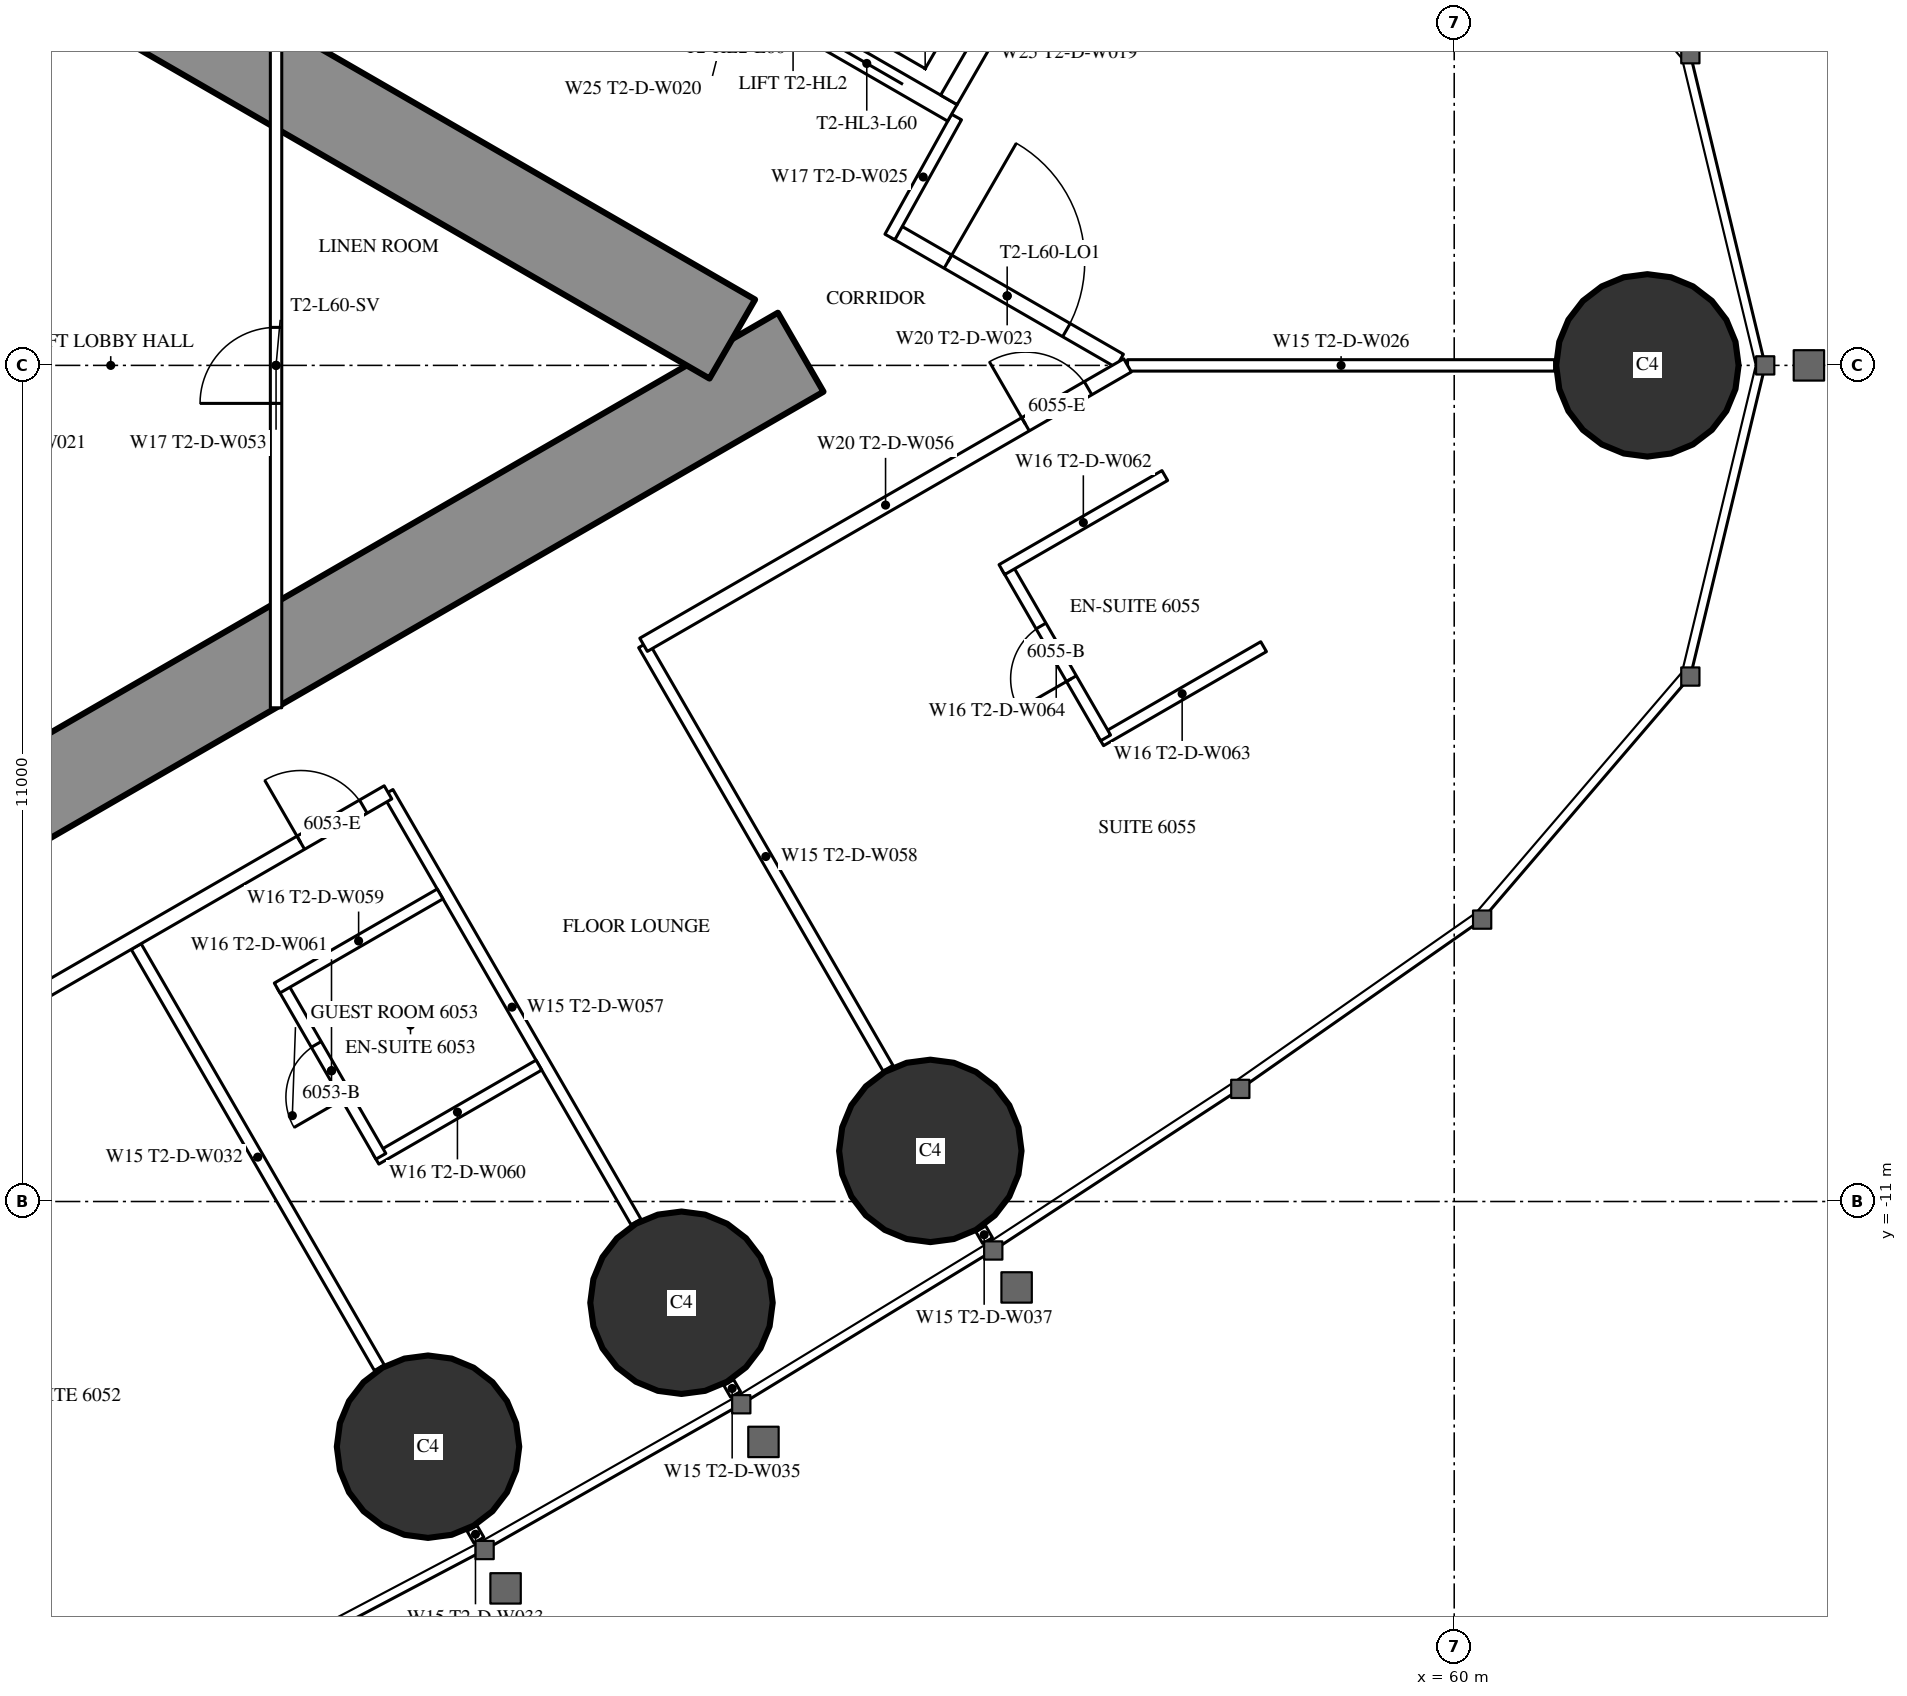
"""IFC4 building model, lengths in metres.
Left out: names, types, materials, properties, quantities, classifications, styles, units other than length and angle.
Written with IfcOpenShell. Run it as: python <this file> out.ifc"""

import sys

from ifc_helpers import new_model, si_unit, direction, frame, frame_2d, origin, origin_2d, place, context, subcontext, project, spatial, rectangle, circle, extrude, element, fill, save


model = new_model("IFC4")
c1 = context("Model", 3, precision=1e-05, world=origin(), true_north=direction((0.0, 1.0)))
c2 = subcontext(c1, "Body", "Model", "MODEL_VIEW")
j1 = project(units=[si_unit("LENGTHUNIT", "METRE"), si_unit("PLANEANGLEUNIT", "RADIAN")], contexts=[c1])
p1 = place(None, origin())
s1 = spatial("IfcSite", under=j1, at=p1, CompositionType="ELEMENT")
p2 = place(p1, origin())
s2 = spatial("IfcBuilding", under=s1, at=p2, CompositionType="ELEMENT")
p3 = place(p2, frame((0.0, 0.0, 226.1)))
s3 = spatial("IfcBuildingStorey", under=s2, at=p3, CompositionType="ELEMENT", Elevation=226.1)
for number, where, z_axis, x_axis in (
    (1, (62.542, 0.0, 0.0), (0.0, 0.0, 1.0), (1.0, 0.0, 0.0)),
    (2, (46.499, -14.226, 0.0), (0.0, 0.0, 1.0), (1.0, 0.0, 0.0)),
    (3, (49.834, -12.332, 0.0), (0.0, 0.0, 1.0), (1.0, 0.0, 0.0)),
    (4, (53.108, -10.334, 0.0), (0.0, 0.0, 1.0), (1.0, 0.0, 0.0)),
):
    element("IfcColumn", number, at=place(p3, frame(where, z_axis=z_axis, x_axis=x_axis)), inside=s3, PredefinedType="COLUMN", context=c2, shape_type="SweptSolid", body=[
        extrude(circle(Radius=1.2, at=origin_2d()), origin(), (0.0, 0.0, 1.0), 3.6),
    ])
p4 = place(p3, frame((27.2, -13.8, 0.0), z_axis=(0.0, 0.0, 1.0), x_axis=(0.866027159892, 0.499996958321, 0.0)))
e5 = element("IfcWall", 5, at=p4, inside=s3, PredefinedType="SHEAR", context=c2, shape_type="SweptSolid", body=[
    extrude(rectangle(XDim=27.947, YDim=1.2, at=frame_2d((13.973, 0.0))), origin(), (0.0, 0.0, 1.0), 3.6),
])
p5 = place(p4, frame((4.6, 0.0, 0.0)))
e6 = element("IfcOpeningElement", 6, at=p5, cuts=e5, PredefinedType="OPENING", context=c2, shape_type="SweptSolid", body=[
    extrude(rectangle(XDim=1.0, YDim=2.2, at=frame_2d((0.5, 1.1))), frame((0.0, 0.61, 0.0), z_axis=(0.0, -1.0, 0.0), x_axis=(1.0, 0.0, 0.0)), (0.0, 0.0, 1.0), 1.22),
])
p6 = place(p4, frame((13.395, 0.0, 0.0)))
e7 = element("IfcOpeningElement", 7, at=p6, cuts=e5, PredefinedType="OPENING", context=c2, shape_type="SweptSolid", body=[
    extrude(rectangle(XDim=1.8, YDim=2.2, at=frame_2d((0.9, 1.1))), frame((0.0, 0.61, 0.0), z_axis=(0.0, -1.0, 0.0), x_axis=(1.0, 0.0, 0.0)), (0.0, 0.0, 1.0), 1.22),
])
p7 = place(p3, frame((27.2, 13.8, 0.0), z_axis=(0.0, 0.0, 1.0), x_axis=(0.866024515034, -0.500001539357, 0.0)))
e8 = element("IfcWall", 8, at=p7, inside=s3, PredefinedType="SHEAR", context=c2, shape_type="SweptSolid", body=[
    extrude(rectangle(XDim=26.907, YDim=1.2, at=frame_2d((13.454, 0.0))), origin(), (0.0, 0.0, 1.0), 3.6),
])
p8 = place(p7, frame((4.6, 0.0, 0.0)))
e9 = element("IfcOpeningElement", 9, at=p8, cuts=e8, PredefinedType="OPENING", context=c2, shape_type="SweptSolid", body=[
    extrude(rectangle(XDim=1.0, YDim=2.2, at=frame_2d((0.5, 1.1))), frame((0.0, 0.61, 0.0), z_axis=(0.0, -1.0, 0.0), x_axis=(1.0, 0.0, 0.0)), (0.0, 0.0, 1.0), 1.22),
])
p9 = place(p7, frame((13.395, 0.0, 0.0)))
e10 = element("IfcOpeningElement", 10, at=p9, cuts=e8, PredefinedType="OPENING", context=c2, shape_type="SweptSolid", body=[
    extrude(rectangle(XDim=1.8, YDim=2.2, at=frame_2d((0.9, 1.1))), frame((0.0, 0.61, 0.0), z_axis=(0.0, -1.0, 0.0), x_axis=(1.0, 0.0, 0.0)), (0.0, 0.0, 1.0), 1.22),
])
p10 = place(p3, frame((42.66, -7.646, 0.0), z_axis=(0.0, 0.0, 1.0), x_axis=(0.499996592859, -0.866027370889, 0.0)))
e11 = element("IfcWall", 11, at=p10, inside=s3, PredefinedType="PARTITIONING", context=c2, shape_type="SweptSolid", body=[
    extrude(rectangle(XDim=6.398, YDim=0.15, at=frame_2d((3.199, 0.0))), origin(), (0.0, 0.0, 1.0), 2.45),
])
p11 = place(p3, frame((47.079, -15.3, 0.0), z_axis=(0.0, 0.0, 1.0), x_axis=(0.499212083968, -0.866479829667, 0.0)))
e12 = element("IfcWall", 12, at=p11, inside=s3, PredefinedType="PARTITIONING", context=c2, shape_type="SweptSolid", body=[
    extrude(rectangle(XDim=0.179, YDim=0.15, at=frame_2d((0.09, 0.0))), origin(), (0.0, 0.0, 1.0), 2.45),
])
p12 = place(p3, frame((45.973, -5.617, 0.0), z_axis=(0.0, 0.0, 1.0), x_axis=(0.499985856986, -0.866033569104, 0.0)))
e13 = element("IfcWall", 13, at=p12, inside=s3, PredefinedType="PARTITIONING", context=c2, shape_type="SweptSolid", body=[
    extrude(rectangle(XDim=6.526, YDim=0.15, at=frame_2d((3.263, 0.0))), origin(), (0.0, 0.0, 1.0), 2.45),
])
p13 = place(p3, frame((50.456, -13.382, 0.0), z_axis=(0.0, 0.0, 1.0), x_axis=(0.500661834965, -0.865642955848, 0.0)))
e14 = element("IfcWall", 14, at=p13, inside=s3, PredefinedType="PARTITIONING", context=c2, shape_type="SweptSolid", body=[
    extrude(rectangle(XDim=0.18, YDim=0.15, at=frame_2d((0.09, 0.0))), origin(), (0.0, 0.0, 1.0), 2.45),
])
p14 = place(p3, frame((49.335, -3.676, 0.0), z_axis=(0.0, 0.0, 1.0), x_axis=(0.500000613642, -0.866025049498, 0.0)))
e15 = element("IfcWall", 15, at=p14, inside=s3, PredefinedType="PARTITIONING", context=c2, shape_type="SweptSolid", body=[
    extrude(rectangle(XDim=6.433, YDim=0.15, at=frame_2d((3.216, 0.0))), origin(), (0.0, 0.0, 1.0), 2.45),
])
p15 = place(p3, frame((53.771, -11.36, 0.0), z_axis=(0.0, 0.0, 1.0), x_axis=(0.499524978789, -0.866299483762, 0.0)))
e16 = element("IfcWall", 16, at=p15, inside=s3, PredefinedType="PARTITIONING", context=c2, shape_type="SweptSolid", body=[
    extrude(rectangle(XDim=0.178, YDim=0.15, at=frame_2d((0.089, 0.0))), origin(), (0.0, 0.0, 1.0), 2.45),
])
p16 = place(p3, frame((55.702, 0.0, 0.0), z_axis=(0.0, 0.0, 1.0), x_axis=(1.0, 0.0, 0.0)))
e17 = element("IfcWall", 17, at=p16, inside=s3, PredefinedType="PARTITIONING", context=c2, shape_type="SweptSolid", body=[
    extrude(rectangle(XDim=5.619, YDim=0.15, at=frame_2d((2.81, 0.0))), origin(), (0.0, 0.0, 1.0), 2.45),
])
p17 = place(p3, frame((52.639, 1.769, 0.0), z_axis=(0.0, 0.0, 1.0), x_axis=(0.866027340901, -0.4999966448, 0.0)))
e18 = element("IfcWall", 18, at=p17, inside=s3, PredefinedType="PARTITIONING", context=c2, shape_type="SweptSolid", body=[
    extrude(rectangle(XDim=3.417, YDim=0.2, at=frame_2d((1.708, 0.0))), origin(), (0.0, 0.0, 1.0), 3.35),
])
p18 = place(p17, frame((0.809, 0.0, 0.0)))
e19 = element("IfcOpeningElement", 19, at=p18, cuts=e18, PredefinedType="OPENING", context=c2, shape_type="SweptSolid", body=[
    extrude(rectangle(XDim=1.8, YDim=2.2, at=frame_2d((0.9, 1.1))), frame((0.0, 0.11, 0.0), z_axis=(0.0, -1.0, 0.0), x_axis=(1.0, 0.0, 0.0)), (0.0, 0.0, 1.0), 0.22),
])
p19 = place(p3, frame((52.576, 1.689, 0.0), z_axis=(0.0, 0.0, 1.0), x_axis=(0.485424724123, 0.874278466629, 0.0)))
e20 = element("IfcWall", 20, at=p19, inside=s3, PredefinedType="PARTITIONING", context=c2, shape_type="SweptSolid", body=[
    extrude(rectangle(XDim=1.805, YDim=0.15, at=frame_2d((0.903, 0.0))), origin(), (0.0, 0.0, 1.0), 3.35),
])
p20 = place(p3, frame((45.814, -10.443, 0.0), z_axis=(0.0, 0.0, 1.0), x_axis=(0.866073894602, 0.499916002032, 0.0)))
e21 = element("IfcWall", 21, at=p20, inside=s3, PredefinedType="PARTITIONING", context=c2, shape_type="SweptSolid", body=[
    extrude(rectangle(XDim=2.475, YDim=0.15, at=frame_2d((1.238, 0.0))), origin(), (0.0, 0.0, 1.0), 3.35),
])
p21 = place(p3, frame((44.579, -8.154, 0.0), z_axis=(0.0, 0.0, 1.0), x_axis=(0.500006934395, -0.866021400173, 0.0)))
e22 = element("IfcWall", 22, at=p21, inside=s3, PredefinedType="PARTITIONING", context=c2, shape_type="SweptSolid", body=[
    extrude(rectangle(XDim=2.6, YDim=0.15, at=frame_2d((1.3, 0.0))), origin(), (0.0, 0.0, 1.0), 3.35),
])
p22 = place(p21, frame((0.9, 0.0, 0.0)))
e23 = element("IfcOpeningElement", 23, at=p22, cuts=e22, PredefinedType="OPENING", context=c2, shape_type="SweptSolid", body=[
    extrude(rectangle(XDim=0.8, YDim=2.2, at=frame_2d((0.4, 1.1))), frame((0.0, 0.085, 0.0), z_axis=(0.0, -1.0, 0.0), x_axis=(1.0, 0.0, 0.0)), (0.0, 0.0, 1.0), 0.17),
])
p23 = place(p3, frame((44.514, -8.191, 0.0), z_axis=(0.0, 0.0, 1.0), x_axis=(0.866031185235, 0.4999899861, 0.0)))
e24 = element("IfcWall", 24, at=p23, inside=s3, PredefinedType="PARTITIONING", context=c2, shape_type="SweptSolid", body=[
    extrude(rectangle(XDim=2.475, YDim=0.15, at=frame_2d((1.238, 0.0))), origin(), (0.0, 0.0, 1.0), 3.35),
])
p24 = place(p3, frame((55.349, -4.938, 0.0), z_axis=(0.0, 0.0, 1.0), x_axis=(0.866006523861, 0.500032699561, 0.0)))
e25 = element("IfcWall", 25, at=p24, inside=s3, PredefinedType="PARTITIONING", context=c2, shape_type="SweptSolid", body=[
    extrude(rectangle(XDim=2.475, YDim=0.15, at=frame_2d((1.237, 0.0))), origin(), (0.0, 0.0, 1.0), 3.35),
])
p25 = place(p3, frame((54.114, -2.649, 0.0), z_axis=(0.0, 0.0, 1.0), x_axis=(0.500006934395, -0.866021400173, 0.0)))
e26 = element("IfcWall", 26, at=p25, inside=s3, PredefinedType="PARTITIONING", context=c2, shape_type="SweptSolid", body=[
    extrude(rectangle(XDim=2.6, YDim=0.15, at=frame_2d((1.3, 0.0))), origin(), (0.0, 0.0, 1.0), 3.35),
])
p26 = place(p25, frame((0.9, 0.0, 0.0)))
e27 = element("IfcOpeningElement", 27, at=p26, cuts=e26, PredefinedType="OPENING", context=c2, shape_type="SweptSolid", body=[
    extrude(rectangle(XDim=0.8, YDim=2.2, at=frame_2d((0.4, 1.1))), frame((0.0, 0.085, 0.0), z_axis=(0.0, -1.0, 0.0), x_axis=(1.0, 0.0, 0.0)), (0.0, 0.0, 1.0), 0.17),
])
p27 = place(p3, frame((54.049, -2.687, 0.0), z_axis=(0.0, 0.0, 1.0), x_axis=(0.866006523861, 0.500032699561, 0.0)))
e28 = element("IfcWall", 28, at=p27, inside=s3, PredefinedType="PARTITIONING", context=c2, shape_type="SweptSolid", body=[
    extrude(rectangle(XDim=2.475, YDim=0.15, at=frame_2d((1.237, 0.0))), origin(), (0.0, 0.0, 1.0), 3.35),
])
p28 = place(p3, frame((28.959, -15.44, 0.0), z_axis=(0.0, 0.0, 1.0), x_axis=(0.866025204199, 0.500000345692, 0.0)))
e29 = element("IfcWall", 29, at=p28, inside=s3, PredefinedType="PARTITIONING", context=c2, shape_type="SweptSolid", body=[
    extrude(rectangle(XDim=19.646, YDim=0.2, at=frame_2d((9.823, 0.0))), origin(), (0.0, 0.0, 1.0), 3.35),
])
p29 = place(p28, frame((1.494, 0.0, 0.0)))
e30 = element("IfcOpeningElement", 30, at=p29, cuts=e29, PredefinedType="OPENING", context=c2, shape_type="SweptSolid", body=[
    extrude(rectangle(XDim=1.8, YDim=2.04, at=frame_2d((0.9, 1.02))), frame((0.0, 0.11, 0.0), z_axis=(0.0, -1.0, 0.0), x_axis=(1.0, 0.0, 0.0)), (0.0, 0.0, 1.0), 0.22),
])
p30 = place(p28, frame((7.687, 0.0, 0.0)))
e31 = element("IfcOpeningElement", 31, at=p30, cuts=e29, PredefinedType="OPENING", context=c2, shape_type="SweptSolid", body=[
    extrude(rectangle(XDim=1.0, YDim=2.2, at=frame_2d((0.5, 1.1))), frame((0.0, 0.11, 0.0), z_axis=(0.0, -1.0, 0.0), x_axis=(1.0, 0.0, 0.0)), (0.0, 0.0, 1.0), 0.22),
])
p31 = place(p28, frame((18.321, 0.0, 0.0)))
e32 = element("IfcOpeningElement", 32, at=p31, cuts=e29, PredefinedType="OPENING", context=c2, shape_type="SweptSolid", body=[
    extrude(rectangle(XDim=0.95, YDim=2.2, at=frame_2d((0.475, 1.1))), frame((0.0, 0.11, 0.0), z_axis=(0.0, -1.0, 0.0), x_axis=(1.0, 0.0, 0.0)), (0.0, 0.0, 1.0), 0.22),
])
p32 = place(p3, frame((49.335, -3.676, 0.0), z_axis=(0.0, 0.0, 1.0), x_axis=(0.866021344046, 0.500007031608, 0.0)))
e33 = element("IfcWall", 33, at=p32, inside=s3, PredefinedType="PARTITIONING", context=c2, shape_type="SweptSolid", body=[
    extrude(rectangle(XDim=7.352, YDim=0.2, at=frame_2d((3.676, 0.0))), origin(), (0.0, 0.0, 1.0), 3.35),
])
p33 = place(p32, frame((5.802, 0.0, 0.0)))
e34 = element("IfcOpeningElement", 34, at=p33, cuts=e33, PredefinedType="OPENING", context=c2, shape_type="SweptSolid", body=[
    extrude(rectangle(XDim=0.95, YDim=2.2, at=frame_2d((0.475, 1.1))), frame((0.0, 0.11, 0.0), z_axis=(0.0, -1.0, 0.0), x_axis=(1.0, 0.0, 0.0)), (0.0, 0.0, 1.0), 0.22),
])
p34 = place(p3, frame((44.5, -4.505, 0.0), z_axis=(0.0, 0.0, 1.0), x_axis=(0.0, 1.0, 0.0)))
e35 = element("IfcWall", 35, at=p34, inside=s3, PredefinedType="PARTITIONING", context=c2, shape_type="SweptSolid", body=[
    extrude(rectangle(XDim=9.009, YDim=0.15, at=frame_2d((4.505, 0.0))), origin(), (0.0, 0.0, 1.0), 3.35),
])
p35 = place(p34, frame((4.005, 0.0, 0.0)))
e36 = element("IfcOpeningElement", 36, at=p35, cuts=e35, PredefinedType="OPENING", context=c2, shape_type="SweptSolid", body=[
    extrude(rectangle(XDim=1.0, YDim=2.2, at=frame_2d((0.5, 1.1))), frame((0.0, 0.085, 0.0), z_axis=(0.0, -1.0, 0.0), x_axis=(1.0, 0.0, 0.0)), (0.0, 0.0, 1.0), 0.17),
])
p36 = place(p3, frame((47.681, 6.622, 0.0), z_axis=(0.0, 0.0, 1.0), x_axis=(0.86603344179, -0.499986077507, 0.0)))
e37 = element("IfcWall", 37, at=p36, inside=s3, PredefinedType="PARTITIONING", context=c2, shape_type="SweptSolid", body=[
    extrude(rectangle(XDim=6.6, YDim=0.25, at=frame_2d((3.3, 0.0))), origin(), (0.0, 0.0, 1.0), 3.35),
])
p37 = place(p36, frame((0.75, 0.0, 0.0)))
e38 = element("IfcOpeningElement", 38, at=p37, cuts=e37, PredefinedType="OPENING", context=c2, shape_type="SweptSolid", body=[
    extrude(rectangle(XDim=1.1, YDim=2.2, at=frame_2d((0.55, 1.1))), frame((0.0, 0.135, 0.0), z_axis=(0.0, -1.0, 0.0), x_axis=(1.0, 0.0, 0.0)), (0.0, 0.0, 1.0), 0.27),
])
p38 = place(p36, frame((2.75, 0.0, 0.0)))
e39 = element("IfcOpeningElement", 39, at=p38, cuts=e37, PredefinedType="OPENING", context=c2, shape_type="SweptSolid", body=[
    extrude(rectangle(XDim=1.1, YDim=2.2, at=frame_2d((0.55, 1.1))), frame((0.0, 0.135, 0.0), z_axis=(0.0, -1.0, 0.0), x_axis=(1.0, 0.0, 0.0)), (0.0, 0.0, 1.0), 0.27),
])
p39 = place(p36, frame((4.75, 0.0, 0.0)))
e40 = element("IfcOpeningElement", 40, at=p39, cuts=e37, PredefinedType="OPENING", context=c2, shape_type="SweptSolid", body=[
    extrude(rectangle(XDim=1.1, YDim=2.2, at=frame_2d((0.55, 1.1))), frame((0.0, 0.135, 0.0), z_axis=(0.0, -1.0, 0.0), x_axis=(1.0, 0.0, 0.0)), (0.0, 0.0, 1.0), 0.27),
])
p40 = place(p3, frame((53.352, 3.493, 0.0), z_axis=(0.0, 0.0, 1.0), x_axis=(0.499872130319, 0.866099216793, 0.0)))
e41 = element("IfcWall", 41, at=p40, inside=s3, PredefinedType="PARTITIONING", context=c2, shape_type="SweptSolid", body=[
    extrude(rectangle(XDim=3.2, YDim=0.25, at=frame_2d((1.6, 0.0))), origin(), (0.0, 0.0, 1.0), 3.35),
])
p41 = place(p22, origin())
e42 = element("IfcDoor", 42, at=p41, inside=s3, OperationType="SINGLE_SWING_RIGHT", PredefinedType="DOOR", context=c2, shape_type="SweptSolid", body=[
    extrude(rectangle(XDim=0.8, YDim=2.2, at=frame_2d((0.4, 1.1))), frame((0.0, 0.025, 0.0), z_axis=(0.0, -1.0, 0.0), x_axis=(1.0, 0.0, 0.0)), (0.0, 0.0, 1.0), 0.05),
])
fill(e23, e42)
p42 = place(p31, origin())
e43 = element("IfcDoor", 43, at=p42, inside=s3, OperationType="SINGLE_SWING_LEFT", PredefinedType="DOOR", context=c2, shape_type="SweptSolid", body=[
    extrude(rectangle(XDim=0.95, YDim=2.2, at=frame_2d((0.475, 1.1))), frame((0.0, 0.025, 0.0), z_axis=(0.0, -1.0, 0.0), x_axis=(1.0, 0.0, 0.0)), (0.0, 0.0, 1.0), 0.05),
])
fill(e32, e43)
p43 = place(p26, origin())
e44 = element("IfcDoor", 44, at=p43, inside=s3, OperationType="SINGLE_SWING_RIGHT", PredefinedType="DOOR", context=c2, shape_type="SweptSolid", body=[
    extrude(rectangle(XDim=0.8, YDim=2.2, at=frame_2d((0.4, 1.1))), frame((0.0, 0.025, 0.0), z_axis=(0.0, -1.0, 0.0), x_axis=(1.0, 0.0, 0.0)), (0.0, 0.0, 1.0), 0.05),
])
fill(e27, e44)
p44 = place(p33, origin())
e45 = element("IfcDoor", 45, at=p44, inside=s3, OperationType="SINGLE_SWING_LEFT", PredefinedType="DOOR", context=c2, shape_type="SweptSolid", body=[
    extrude(rectangle(XDim=0.95, YDim=2.2, at=frame_2d((0.475, 1.1))), frame((0.0, 0.025, 0.0), z_axis=(0.0, -1.0, 0.0), x_axis=(1.0, 0.0, 0.0)), (0.0, 0.0, 1.0), 0.05),
])
fill(e34, e45)
p45 = place(p18, origin())
e46 = element("IfcDoor", 46, at=p45, inside=s3, OperationType="DOUBLE_DOOR_SINGLE_SWING", PredefinedType="DOOR", context=c2, shape_type="SweptSolid", body=[
    extrude(rectangle(XDim=1.8, YDim=2.2, at=frame_2d((0.9, 1.1))), frame((0.0, 0.025, 0.0), z_axis=(0.0, -1.0, 0.0), x_axis=(1.0, 0.0, 0.0)), (0.0, 0.0, 1.0), 0.05),
])
fill(e19, e46)
p46 = place(p35, origin())
e47 = element("IfcDoor", 47, at=p46, inside=s3, OperationType="SINGLE_SWING_LEFT", PredefinedType="DOOR", context=c2, shape_type="SweptSolid", body=[
    extrude(rectangle(XDim=1.0, YDim=2.2, at=frame_2d((0.5, 1.1))), frame((0.0, 0.025, 0.0), z_axis=(0.0, -1.0, 0.0), x_axis=(1.0, 0.0, 0.0)), (0.0, 0.0, 1.0), 0.05),
])
fill(e36, e47)
p47 = place(p39, origin())
e48 = element("IfcDoor", 48, at=p47, inside=s3, OperationType="DOUBLE_DOOR_SLIDING", PredefinedType="USERDEFINED", context=c2, shape_type="SweptSolid", body=[
    extrude(rectangle(XDim=1.1, YDim=2.2, at=frame_2d((0.55, 1.1))), frame((0.0, 0.025, 0.0), z_axis=(0.0, -1.0, 0.0), x_axis=(1.0, 0.0, 0.0)), (0.0, 0.0, 1.0), 0.05),
])
fill(e40, e48)
save(model, sys.argv[1])
